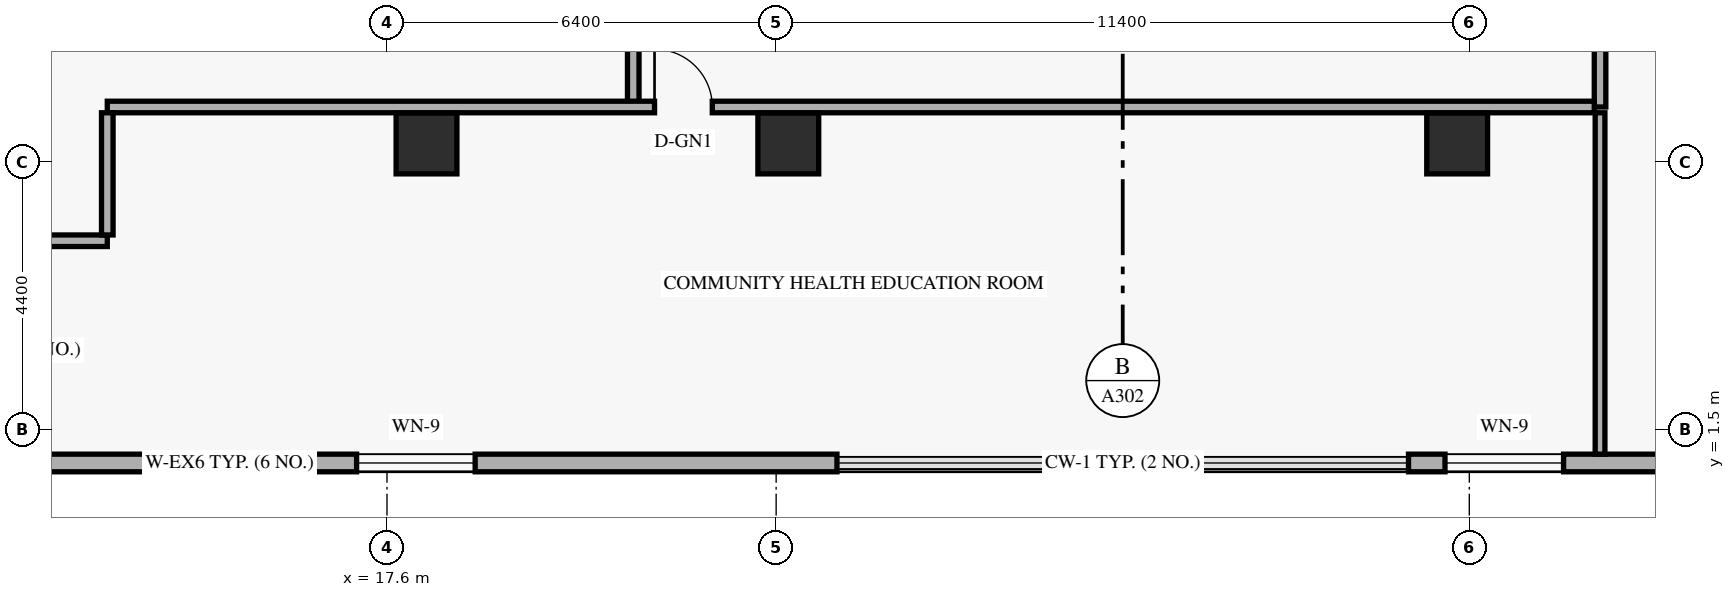
"""IFC4 building model, lengths in metres.
Left out: names, types, materials, properties, quantities, classifications, styles, units other than length and angle.
Written with IfcOpenShell. Run it as: python <this file> out.ifc"""

import sys

from ifc_helpers import new_model, si_unit, direction, frame, frame_2d, origin, origin_2d, place, context, subcontext, project, spatial, rectangle, extrude, element, fill, save


model = new_model("IFC4")
c1 = context("Model", 3, precision=1e-05, world=origin(), true_north=direction((0.0, 1.0)))
c2 = subcontext(c1, "Body", "Model", "MODEL_VIEW")
j1 = project(units=[si_unit("LENGTHUNIT", "METRE"), si_unit("PLANEANGLEUNIT", "RADIAN")], contexts=[c1])
p1 = place(None, origin())
s1 = spatial("IfcSite", under=j1, at=p1, CompositionType="ELEMENT")
p2 = place(p1, origin())
s2 = spatial("IfcBuilding", under=s1, at=p2, CompositionType="ELEMENT")
p3 = place(p2, frame((0.0, 0.0, 9.6)))
s3 = spatial("IfcBuildingStorey", under=s2, at=p3, CompositionType="ELEMENT", Elevation=9.6)
for number, where, z_axis, x_axis in (
    (1, (18.25, 6.2, 0.0), (0.0, 0.0, 1.0), (1.0, 0.0, 0.0)),
    (2, (24.2, 6.2, 0.0), (0.0, 0.0, 1.0), (1.0, 0.0, 0.0)),
    (3, (35.2, 6.2, 0.0), (0.0, 0.0, 1.0), (1.0, 0.0, 0.0)),
):
    element("IfcColumn", number, at=place(p3, frame(where, z_axis=z_axis, x_axis=x_axis)), inside=s3, PredefinedType="COLUMN", context=c2, shape_type="SweptSolid", body=[
        extrude(rectangle(XDim=1.0, YDim=1.0, at=origin_2d()), origin(), (0.0, 0.0, 1.0), 4.8),
    ])
p4 = place(p3, frame((5.02, 0.945, 0.0), z_axis=(0.0, 0.0, 1.0), x_axis=(1.0, 0.0, 0.0)))
e4 = element("IfcWall", 4, at=p4, inside=s3, PredefinedType="SOLIDWALL", context=c2, shape_type="SweptSolid", body=[
    extrude(rectangle(XDim=19.98, YDim=0.29, at=frame_2d((9.99, 0.0))), origin(), (0.0, 0.0, 1.0), 4.52),
])
p5 = place(p4, frame((2.09, 0.0, 0.85)))
e5 = element("IfcOpeningElement", 5, at=p5, cuts=e4, PredefinedType="OPENING", context=c2, shape_type="SweptSolid", body=[
    extrude(rectangle(XDim=1.95, YDim=1.75, at=frame_2d((0.975, 0.875))), frame((0.0, 0.155, 0.0), z_axis=(0.0, -1.0, 0.0), x_axis=(1.0, 0.0, 0.0)), (0.0, 0.0, 1.0), 0.31),
])
p6 = place(p4, frame((12.08, 0.0, 0.85)))
e6 = element("IfcOpeningElement", 6, at=p6, cuts=e4, PredefinedType="OPENING", context=c2, shape_type="SweptSolid", body=[
    extrude(rectangle(XDim=1.95, YDim=1.75, at=frame_2d((0.975, 0.875))), frame((0.0, 0.155, 0.0), z_axis=(0.0, -1.0, 0.0), x_axis=(1.0, 0.0, 0.0)), (0.0, 0.0, 1.0), 0.31),
])
p7 = place(p3, frame((34.4, 0.945, 0.0), z_axis=(0.0, 0.0, 1.0), x_axis=(1.0, 0.0, 0.0)))
e7 = element("IfcWall", 7, at=p7, inside=s3, PredefinedType="SOLIDWALL", context=c2, shape_type="SweptSolid", body=[
    extrude(rectangle(XDim=14.98, YDim=0.29, at=frame_2d((7.49, 0.0))), origin(), (0.0, 0.0, 1.0), 4.52),
])
p8 = place(p7, frame((0.6, 0.0, 0.85)))
e8 = element("IfcOpeningElement", 8, at=p8, cuts=e7, PredefinedType="OPENING", context=c2, shape_type="SweptSolid", body=[
    extrude(rectangle(XDim=1.95, YDim=1.75, at=frame_2d((0.975, 0.875))), frame((0.0, 0.155, 0.0), z_axis=(0.0, -1.0, 0.0), x_axis=(1.0, 0.0, 0.0)), (0.0, 0.0, 1.0), 0.31),
])
p9 = place(p7, frame((8.09, 0.0, 0.85)))
e9 = element("IfcOpeningElement", 9, at=p9, cuts=e7, PredefinedType="OPENING", context=c2, shape_type="SweptSolid", body=[
    extrude(rectangle(XDim=1.95, YDim=1.75, at=frame_2d((0.975, 0.875))), frame((0.0, 0.155, 0.0), z_axis=(0.0, -1.0, 0.0), x_axis=(1.0, 0.0, 0.0)), (0.0, 0.0, 1.0), 0.31),
])
p10 = place(p3, frame((21.65, 6.8, 0.0), z_axis=(0.0, 0.0, 1.0), x_axis=(0.0, 1.0, 0.0)))
e10 = element("IfcWall", 10, at=p10, inside=s3, PredefinedType="STANDARD", context=c2, shape_type="SweptSolid", body=[
    extrude(rectangle(XDim=34.4, YDim=0.19, at=frame_2d((17.2, 0.0))), origin(), (0.0, 0.0, 1.0), 3.575),
])
p11 = place(p10, frame((20.96, 0.0, 0.0)))
e11 = element("IfcOpeningElement", 11, at=p11, cuts=e10, PredefinedType="OPENING", context=c2, shape_type="SweptSolid", body=[
    extrude(rectangle(XDim=0.92, YDim=2.14, at=frame_2d((0.46, 1.07))), frame((0.0, 0.105, 0.0), z_axis=(0.0, -1.0, 0.0), x_axis=(1.0, 0.0, 0.0)), (0.0, 0.0, 1.0), 0.21),
])
p12 = place(p10, frame((28.2, 0.0, 0.0)))
e12 = element("IfcOpeningElement", 12, at=p12, cuts=e10, PredefinedType="OPENING", context=c2, shape_type="SweptSolid", body=[
    extrude(rectangle(XDim=0.95, YDim=2.15, at=frame_2d((0.475, 1.075))), frame((0.0, 0.105, 0.0), z_axis=(0.0, -1.0, 0.0), x_axis=(1.0, 0.0, 0.0)), (0.0, 0.0, 1.0), 0.21),
])
p13 = place(p10, frame((6.0, 0.0, 0.0)))
e13 = element("IfcOpeningElement", 13, at=p13, cuts=e10, PredefinedType="OPENING", context=c2, shape_type="SweptSolid", body=[
    extrude(rectangle(XDim=0.9, YDim=2.1, at=frame_2d((0.45, 1.05))), frame((0.0, 0.105, 0.0), z_axis=(0.0, -1.0, 0.0), x_axis=(1.0, 0.0, 0.0)), (0.0, 0.0, 1.0), 0.21),
])
p14 = place(p3, frame((37.55, 6.8, 0.0), z_axis=(0.0, 0.0, 1.0), x_axis=(0.0, 1.0, 0.0)))
e14 = element("IfcWall", 14, at=p14, inside=s3, PredefinedType="STANDARD", context=c2, shape_type="SweptSolid", body=[
    extrude(rectangle(XDim=34.4, YDim=0.19, at=frame_2d((17.2, 0.0))), origin(), (0.0, 0.0, 1.0), 3.575),
])
p15 = place(p14, frame((3.0, 0.0, 0.0)))
e15 = element("IfcOpeningElement", 15, at=p15, cuts=e14, PredefinedType="OPENING", context=c2, shape_type="SweptSolid", body=[
    extrude(rectangle(XDim=1.05, YDim=2.15, at=frame_2d((0.525, 1.075))), frame((0.0, 0.105, 0.0), z_axis=(0.0, -1.0, 0.0), x_axis=(1.0, 0.0, 0.0)), (0.0, 0.0, 1.0), 0.21),
])
p16 = place(p14, frame((16.673, 0.0, 0.0)))
e16 = element("IfcOpeningElement", 16, at=p16, cuts=e14, PredefinedType="OPENING", context=c2, shape_type="SweptSolid", body=[
    extrude(rectangle(XDim=1.2, YDim=2.15, at=frame_2d((0.6, 1.075))), frame((0.0, 0.105, 0.0), z_axis=(0.0, -1.0, 0.0), x_axis=(1.0, 0.0, 0.0)), (0.0, 0.0, 1.0), 0.21),
])
p17 = place(p14, frame((28.13, 0.0, 0.0)))
e17 = element("IfcOpeningElement", 17, at=p17, cuts=e14, PredefinedType="OPENING", context=c2, shape_type="SweptSolid", body=[
    extrude(rectangle(XDim=1.05, YDim=2.15, at=frame_2d((0.525, 1.075))), frame((0.0, 0.105, 0.0), z_axis=(0.0, -1.0, 0.0), x_axis=(1.0, 0.0, 0.0)), (0.0, 0.0, 1.0), 0.21),
])
p18 = place(p3, frame((13.0, 6.8, 0.0), z_axis=(0.0, 0.0, 1.0), x_axis=(1.0, 0.0, 0.0)))
e18 = element("IfcWall", 18, at=p18, inside=s3, PredefinedType="STANDARD", context=c2, shape_type="SweptSolid", body=[
    extrude(rectangle(XDim=24.455, YDim=0.19, at=frame_2d((12.228, 0.0))), origin(), (0.0, 0.0, 1.0), 3.732),
])
p19 = place(p18, frame((9.0, 0.0, 0.0)))
e19 = element("IfcOpeningElement", 19, at=p19, cuts=e18, PredefinedType="OPENING", context=c2, shape_type="SweptSolid", body=[
    extrude(rectangle(XDim=0.95, YDim=2.15, at=frame_2d((0.475, 1.075))), frame((0.0, 0.105, 0.0), z_axis=(0.0, -1.0, 0.0), x_axis=(1.0, 0.0, 0.0)), (0.0, 0.0, 1.0), 0.21),
])
p20 = place(p3, frame((11.15, 4.6, 0.0), z_axis=(0.0, 0.0, 1.0), x_axis=(1.0, 0.0, 0.0)))
e20 = element("IfcWall", 20, at=p20, inside=s3, PredefinedType="STANDARD", context=c2, shape_type="SweptSolid", body=[
    extrude(rectangle(XDim=1.85, YDim=0.19, at=frame_2d((0.925, 0.0))), origin(), (0.0, 0.0, 1.0), 4.52),
])
p21 = place(p3, frame((13.0, 4.695, 0.0), z_axis=(0.0, 0.0, 1.0), x_axis=(0.0, 1.0, 0.0)))
e21 = element("IfcWall", 21, at=p21, inside=s3, PredefinedType="STANDARD", context=c2, shape_type="SweptSolid", body=[
    extrude(rectangle(XDim=2.01, YDim=0.19, at=frame_2d((1.005, 0.0))), origin(), (0.0, 0.0, 1.0), 3.969),
])
p22 = place(p3, frame((37.55, 1.09, 0.0), z_axis=(0.0, 0.0, 1.0), x_axis=(0.0, 1.0, 0.0)))
e22 = element("IfcWall", 22, at=p22, inside=s3, PredefinedType="PARTITIONING", context=c2, shape_type="SweptSolid", body=[
    extrude(rectangle(XDim=5.615, YDim=0.16, at=frame_2d((2.808, 0.0))), origin(), (0.0, 0.0, 1.0), 3.969),
])
p23 = place(p6, origin())
e23 = element("IfcWindow", 23, at=p23, inside=s3, PartitioningType="SINGLE_PANEL", PredefinedType="WINDOW", context=c2, shape_type="SweptSolid", body=[
    extrude(rectangle(XDim=1.95, YDim=1.75, at=frame_2d((0.975, 0.875))), frame((0.0, 0.03, 0.0), z_axis=(0.0, -1.0, 0.0), x_axis=(1.0, 0.0, 0.0)), (0.0, 0.0, 1.0), 0.06),
])
fill(e6, e23)
p24 = place(p8, origin())
e24 = element("IfcWindow", 24, at=p24, inside=s3, PartitioningType="SINGLE_PANEL", PredefinedType="WINDOW", context=c2, shape_type="SweptSolid", body=[
    extrude(rectangle(XDim=1.95, YDim=1.75, at=frame_2d((0.975, 0.875))), frame((0.0, 0.03, 0.0), z_axis=(0.0, -1.0, 0.0), x_axis=(1.0, 0.0, 0.0)), (0.0, 0.0, 1.0), 0.06),
])
fill(e8, e24)
p25 = place(p19, origin())
e25 = element("IfcDoor", 25, at=p25, inside=s3, OperationType="SINGLE_SWING_LEFT", PredefinedType="DOOR", context=c2, shape_type="SweptSolid", body=[
    extrude(rectangle(XDim=0.95, YDim=2.15, at=frame_2d((0.475, 1.075))), frame((0.0, 0.025, 0.0), z_axis=(0.0, -1.0, 0.0), x_axis=(1.0, 0.0, 0.0)), (0.0, 0.0, 1.0), 0.05),
])
fill(e19, e25)
save(model, sys.argv[1])
